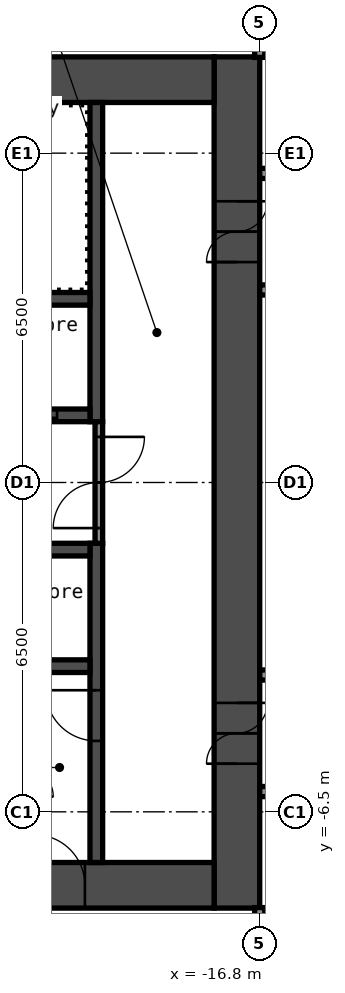
"""IFC4 building model, lengths in metres.
Left out: names, types, materials, properties, quantities, classifications, styles, units other than length and angle.
Written with IfcOpenShell. Run it as: python <this file> out.ifc"""

import sys

from ifc_helpers import new_model, si_unit, direction, frame, frame_2d, origin, place, context, subcontext, project, spatial, rectangle, extrude, element, fill, save


model = new_model("IFC4")
c1 = context("Model", 3, precision=1e-05, world=origin(), true_north=direction((0.0, 1.0)))
c2 = subcontext(c1, "Body", "Model", "MODEL_VIEW")
j1 = project(units=[si_unit("LENGTHUNIT", "METRE"), si_unit("PLANEANGLEUNIT", "RADIAN")], contexts=[c1])
p1 = place(None, origin())
s1 = spatial("IfcSite", under=j1, at=p1, CompositionType="ELEMENT")
p2 = place(p1, origin())
s2 = spatial("IfcBuilding", under=s1, at=p2, CompositionType="ELEMENT")
p3 = place(p2, frame((0.0, 0.0, 35.8)))
s3 = spatial("IfcBuildingStorey", under=s2, at=p3, CompositionType="ELEMENT", Elevation=35.8)
p4 = place(p3, frame((-17.25, -8.4, 0.0), z_axis=(0.0, 0.0, 1.0), x_axis=(0.0, 1.0, 0.0)))
e1 = element("IfcWall", 1, at=p4, inside=s3, PredefinedType="SHEAR", context=c2, shape_type="SweptSolid", body=[
    extrude(rectangle(XDim=16.8, YDim=0.9, at=frame_2d((8.4, 0.0))), origin(), (0.0, 0.0, 1.0), 2.8),
])
p5 = place(p4, frame((12.75, 0.0, 0.0)))
e2 = element("IfcOpeningElement", 2, at=p5, cuts=e1, PredefinedType="OPENING", context=c2, shape_type="SweptSolid", body=[
    extrude(rectangle(XDim=1.2, YDim=2.1, at=frame_2d((0.6, 1.05))), frame((0.0, 0.46, 0.0), z_axis=(0.0, -1.0, 0.0), x_axis=(1.0, 0.0, 0.0)), (0.0, 0.0, 1.0), 0.92),
])
p6 = place(p4, frame((2.85, 0.0, 0.0)))
e3 = element("IfcOpeningElement", 3, at=p6, cuts=e1, PredefinedType="OPENING", context=c2, shape_type="SweptSolid", body=[
    extrude(rectangle(XDim=1.2, YDim=2.1, at=frame_2d((0.6, 1.05))), frame((0.0, 0.46, 0.0), z_axis=(0.0, -1.0, 0.0), x_axis=(1.0, 0.0, 0.0)), (0.0, 0.0, 1.0), 0.92),
])
p7 = place(p3, frame((-32.7, 7.95, 0.0), z_axis=(0.0, 0.0, 1.0), x_axis=(1.0, 0.0, 0.0)))
e4 = element("IfcWall", 4, at=p7, inside=s3, PredefinedType="SHEAR", context=c2, shape_type="SweptSolid", body=[
    extrude(rectangle(XDim=15.0, YDim=0.9, at=frame_2d((7.5, 0.0))), origin(), (0.0, 0.0, 1.0), 2.8),
])
p8 = place(p7, frame((3.4, 0.0, 0.0)))
e5 = element("IfcOpeningElement", 5, at=p8, cuts=e4, PredefinedType="OPENING", context=c2, shape_type="SweptSolid", body=[
    extrude(rectangle(XDim=1.2, YDim=2.1, at=frame_2d((0.6, 1.05))), frame((0.0, 0.46, 0.0), z_axis=(0.0, -1.0, 0.0), x_axis=(1.0, 0.0, 0.0)), (0.0, 0.0, 1.0), 0.92),
])
p9 = place(p7, frame((0.75, 0.0, 0.0)))
e6 = element("IfcOpeningElement", 6, at=p9, cuts=e4, PredefinedType="OPENING", context=c2, shape_type="SweptSolid", body=[
    extrude(rectangle(XDim=0.9, YDim=2.1, at=frame_2d((0.45, 1.05))), frame((0.0, 0.46, 0.0), z_axis=(0.0, -1.0, 0.0), x_axis=(1.0, 0.0, 0.0)), (0.0, 0.0, 1.0), 0.92),
])
p10 = place(p3, frame((-32.7, -7.95, 0.0), z_axis=(0.0, 0.0, 1.0), x_axis=(1.0, 0.0, 0.0)))
e7 = element("IfcWall", 7, at=p10, inside=s3, PredefinedType="SHEAR", context=c2, shape_type="SweptSolid", body=[
    extrude(rectangle(XDim=15.0, YDim=0.9, at=frame_2d((7.5, 0.0))), origin(), (0.0, 0.0, 1.0), 2.8),
])
p11 = place(p10, frame((11.45, 0.0, 0.0)))
e8 = element("IfcOpeningElement", 8, at=p11, cuts=e7, PredefinedType="OPENING", context=c2, shape_type="SweptSolid", body=[
    extrude(rectangle(XDim=1.0, YDim=2.1, at=frame_2d((0.5, 1.05))), frame((0.0, 0.46, 0.0), z_axis=(0.0, -1.0, 0.0), x_axis=(1.0, 0.0, 0.0)), (0.0, 0.0, 1.0), 0.92),
])
p12 = place(p3, frame((-20.025, 1.2, 0.0), z_axis=(0.0, 0.0, 1.0), x_axis=(0.0, 1.0, 0.0)))
e9 = element("IfcWall", 9, at=p12, inside=s3, PredefinedType="SHEAR", context=c2, shape_type="SweptSolid", body=[
    extrude(rectangle(XDim=6.3, YDim=0.25, at=frame_2d((3.15, 0.0))), origin(), (0.0, 0.0, 1.0), 2.8),
])
p13 = place(p3, frame((-20.025, -7.5, 0.0), z_axis=(0.0, 0.0, 1.0), x_axis=(0.0, 1.0, 0.0)))
e10 = element("IfcWall", 10, at=p13, inside=s3, PredefinedType="SHEAR", context=c2, shape_type="SweptSolid", body=[
    extrude(rectangle(XDim=6.3, YDim=0.25, at=frame_2d((3.15, 0.0))), origin(), (0.0, 0.0, 1.0), 2.8),
])
p14 = place(p13, frame((2.4, 0.0, 0.0)))
e11 = element("IfcOpeningElement", 11, at=p14, cuts=e10, PredefinedType="OPENING", context=c2, shape_type="SweptSolid", body=[
    extrude(rectangle(XDim=1.0, YDim=2.1, at=frame_2d((0.5, 1.05))), frame((0.0, 0.135, 0.0), z_axis=(0.0, -1.0, 0.0), x_axis=(1.0, 0.0, 0.0)), (0.0, 0.0, 1.0), 0.27),
])
p15 = place(p3, frame((-27.65, 1.325, 0.0), z_axis=(0.0, 0.0, 1.0), x_axis=(1.0, 0.0, 0.0)))
e12 = element("IfcWall", 12, at=p15, inside=s3, PredefinedType="SHEAR", context=c2, shape_type="SweptSolid", body=[
    extrude(rectangle(XDim=7.5, YDim=0.25, at=frame_2d((3.75, 0.0))), origin(), (0.0, 0.0, 1.0), 2.8),
])
p16 = place(p15, frame((5.75, 0.0, 0.0)))
e13 = element("IfcOpeningElement", 13, at=p16, cuts=e12, PredefinedType="OPENING", context=c2, shape_type="SweptSolid", body=[
    extrude(rectangle(XDim=1.1, YDim=2.1, at=frame_2d((0.55, 1.05))), frame((0.0, 0.135, 0.0), z_axis=(0.0, -1.0, 0.0), x_axis=(1.0, 0.0, 0.0)), (0.0, 0.0, 1.0), 0.27),
])
p17 = place(p15, frame((3.35, 0.0, 0.0)))
e14 = element("IfcOpeningElement", 14, at=p17, cuts=e12, PredefinedType="OPENING", context=c2, shape_type="SweptSolid", body=[
    extrude(rectangle(XDim=1.1, YDim=2.1, at=frame_2d((0.55, 1.05))), frame((0.0, 0.135, 0.0), z_axis=(0.0, -1.0, 0.0), x_axis=(1.0, 0.0, 0.0)), (0.0, 0.0, 1.0), 0.27),
])
p18 = place(p15, frame((0.95, 0.0, 0.0)))
e15 = element("IfcOpeningElement", 15, at=p18, cuts=e12, PredefinedType="OPENING", context=c2, shape_type="SweptSolid", body=[
    extrude(rectangle(XDim=1.1, YDim=2.1, at=frame_2d((0.55, 1.05))), frame((0.0, 0.135, 0.0), z_axis=(0.0, -1.0, 0.0), x_axis=(1.0, 0.0, 0.0)), (0.0, 0.0, 1.0), 0.27),
])
for number, where, z_axis, x_axis in (
    (16, (-27.65, 3.625, 0.0), (0.0, 0.0, 1.0), (1.0, 0.0, 0.0)),
    (17, (-27.65, -1.325, 0.0), (0.0, 0.0, 1.0), (1.0, 0.0, 0.0)),
    (18, (-27.65, -3.625, 0.0), (0.0, 0.0, 1.0), (1.0, 0.0, 0.0)),
):
    element("IfcWall", number, at=place(p3, frame(where, z_axis=z_axis, x_axis=x_axis)), inside=s3, PredefinedType="SHEAR", context=c2, shape_type="SweptSolid", body=[
        extrude(rectangle(XDim=7.5, YDim=0.25, at=frame_2d((3.75, 0.0))), origin(), (0.0, 0.0, 1.0), 2.8),
    ])
p19 = place(p3, frame((-19.975, -1.2, 0.0), z_axis=(0.0, 0.0, 1.0), x_axis=(0.0, 1.0, 0.0)))
e19 = element("IfcWall", 19, at=p19, inside=s3, PredefinedType="PARTITIONING", context=c2, shape_type="SweptSolid", body=[
    extrude(rectangle(XDim=2.4, YDim=0.15, at=frame_2d((1.2, 0.0))), origin(), (0.0, 0.0, 1.0), 2.8),
])
p20 = place(p19, frame((0.3, 0.0, 0.0)))
e20 = element("IfcOpeningElement", 20, at=p20, cuts=e19, PredefinedType="OPENING", context=c2, shape_type="SweptSolid", body=[
    extrude(rectangle(XDim=1.8, YDim=2.1, at=frame_2d((0.9, 1.05))), frame((0.0, 0.085, 0.0), z_axis=(0.0, -1.0, 0.0), x_axis=(1.0, 0.0, 0.0)), (0.0, 0.0, 1.0), 0.17),
])
p21 = place(p3, frame((-16.8, -6.1, 0.0), z_axis=(0.0, 0.0, 1.0), x_axis=(1.0, 0.0, 0.0)))
e21 = element("IfcWall", 21, at=p21, inside=s3, PredefinedType="PARTITIONING", context=c2, shape_type="SweptSolid", body=[
    extrude(rectangle(XDim=33.6, YDim=0.2, at=frame_2d((16.8, 0.0))), origin(), (0.0, 0.0, 1.0), 2.8),
])
p22 = place(p21, frame((5.4, 0.0, 0.0)))
e22 = element("IfcOpeningElement", 22, at=p22, cuts=e21, PredefinedType="OPENING", context=c2, shape_type="SweptSolid", body=[
    extrude(rectangle(XDim=1.0, YDim=2.1, at=frame_2d((0.5, 1.05))), frame((0.0, 0.11, 0.0), z_axis=(0.0, -1.0, 0.0), x_axis=(1.0, 0.0, 0.0)), (0.0, 0.0, 1.0), 0.22),
])
p23 = place(p21, frame((9.545, 0.0, 0.0)))
e23 = element("IfcOpeningElement", 23, at=p23, cuts=e21, PredefinedType="OPENING", context=c2, shape_type="SweptSolid", body=[
    extrude(rectangle(XDim=0.9, YDim=2.1, at=frame_2d((0.45, 1.05))), frame((0.0, 0.11, 0.0), z_axis=(0.0, -1.0, 0.0), x_axis=(1.0, 0.0, 0.0)), (0.0, 0.0, 1.0), 0.22),
])
p24 = place(p21, frame((13.745, 0.0, 0.0)))
e24 = element("IfcOpeningElement", 24, at=p24, cuts=e21, PredefinedType="OPENING", context=c2, shape_type="SweptSolid", body=[
    extrude(rectangle(XDim=0.9, YDim=2.1, at=frame_2d((0.45, 1.05))), frame((0.0, 0.11, 0.0), z_axis=(0.0, -1.0, 0.0), x_axis=(1.0, 0.0, 0.0)), (0.0, 0.0, 1.0), 0.22),
])
p25 = place(p21, frame((22.2, 0.0, 0.0)))
e25 = element("IfcOpeningElement", 25, at=p25, cuts=e21, PredefinedType="OPENING", context=c2, shape_type="SweptSolid", body=[
    extrude(rectangle(XDim=1.0, YDim=2.1, at=frame_2d((0.5, 1.05))), frame((0.0, 0.11, 0.0), z_axis=(0.0, -1.0, 0.0), x_axis=(1.0, 0.0, 0.0)), (0.0, 0.0, 1.0), 0.22),
])
p26 = place(p21, frame((30.6, 0.0, 0.0)))
e26 = element("IfcOpeningElement", 26, at=p26, cuts=e21, PredefinedType="OPENING", context=c2, shape_type="SweptSolid", body=[
    extrude(rectangle(XDim=1.0, YDim=2.1, at=frame_2d((0.5, 1.05))), frame((0.0, 0.11, 0.0), z_axis=(0.0, -1.0, 0.0), x_axis=(1.0, 0.0, 0.0)), (0.0, 0.0, 1.0), 0.22),
])
p27 = place(p3, frame((-16.8, -3.8, 0.0), z_axis=(0.0, 0.0, 1.0), x_axis=(1.0, 0.0, 0.0)))
e27 = element("IfcWall", 27, at=p27, inside=s3, PredefinedType="PARTITIONING", context=c2, shape_type="SweptSolid", body=[
    extrude(rectangle(XDim=33.6, YDim=0.2, at=frame_2d((16.8, 0.0))), origin(), (0.0, 0.0, 1.0), 2.8),
])
p28 = place(p27, frame((9.8, 0.0, 0.0)))
e28 = element("IfcOpeningElement", 28, at=p28, cuts=e27, PredefinedType="OPENING", context=c2, shape_type="SweptSolid", body=[
    extrude(rectangle(XDim=0.9, YDim=2.1, at=frame_2d((0.45, 1.05))), frame((0.0, 0.11, 0.0), z_axis=(0.0, -1.0, 0.0), x_axis=(1.0, 0.0, 0.0)), (0.0, 0.0, 1.0), 0.22),
])
p29 = place(p27, frame((14.0, 0.0, 0.0)))
e29 = element("IfcOpeningElement", 29, at=p29, cuts=e27, PredefinedType="OPENING", context=c2, shape_type="SweptSolid", body=[
    extrude(rectangle(XDim=0.9, YDim=2.1, at=frame_2d((0.45, 1.05))), frame((0.0, 0.11, 0.0), z_axis=(0.0, -1.0, 0.0), x_axis=(1.0, 0.0, 0.0)), (0.0, 0.0, 1.0), 0.22),
])
p30 = place(p27, frame((27.355, 0.0, 0.0)))
e30 = element("IfcOpeningElement", 30, at=p30, cuts=e27, PredefinedType="OPENING", context=c2, shape_type="SweptSolid", body=[
    extrude(rectangle(XDim=0.9, YDim=2.1, at=frame_2d((0.45, 1.05))), frame((0.0, 0.11, 0.0), z_axis=(0.0, -1.0, 0.0), x_axis=(1.0, 0.0, 0.0)), (0.0, 0.0, 1.0), 0.22),
])
p31 = place(p27, frame((31.555, 0.0, 0.0)))
e31 = element("IfcOpeningElement", 31, at=p31, cuts=e27, PredefinedType="OPENING", context=c2, shape_type="SweptSolid", body=[
    extrude(rectangle(XDim=0.9, YDim=2.1, at=frame_2d((0.45, 1.05))), frame((0.0, 0.11, 0.0), z_axis=(0.0, -1.0, 0.0), x_axis=(1.0, 0.0, 0.0)), (0.0, 0.0, 1.0), 0.22),
])
p32 = place(p3, frame((-16.8, 3.8, 0.0), z_axis=(0.0, 0.0, 1.0), x_axis=(1.0, 0.0, 0.0)))
e32 = element("IfcWall", 32, at=p32, inside=s3, PredefinedType="PARTITIONING", context=c2, shape_type="SweptSolid", body=[
    extrude(rectangle(XDim=33.6, YDim=0.2, at=frame_2d((16.8, 0.0))), origin(), (0.0, 0.0, 1.0), 2.8),
])
p33 = place(p32, frame((1.9, 0.0, 0.0)))
e33 = element("IfcOpeningElement", 33, at=p33, cuts=e32, PredefinedType="OPENING", context=c2, shape_type="SweptSolid", body=[
    extrude(rectangle(XDim=0.9, YDim=2.1, at=frame_2d((0.45, 1.05))), frame((0.0, 0.11, 0.0), z_axis=(0.0, -1.0, 0.0), x_axis=(1.0, 0.0, 0.0)), (0.0, 0.0, 1.0), 0.22),
])
p34 = place(p32, frame((6.1, 0.0, 0.0)))
e34 = element("IfcOpeningElement", 34, at=p34, cuts=e32, PredefinedType="OPENING", context=c2, shape_type="SweptSolid", body=[
    extrude(rectangle(XDim=0.9, YDim=2.1, at=frame_2d((0.45, 1.05))), frame((0.0, 0.11, 0.0), z_axis=(0.0, -1.0, 0.0), x_axis=(1.0, 0.0, 0.0)), (0.0, 0.0, 1.0), 0.22),
])
p35 = place(p32, frame((18.115, 0.0, 0.0)))
e35 = element("IfcOpeningElement", 35, at=p35, cuts=e32, PredefinedType="OPENING", context=c2, shape_type="SweptSolid", body=[
    extrude(rectangle(XDim=0.9, YDim=2.1, at=frame_2d((0.45, 1.05))), frame((0.0, 0.11, 0.0), z_axis=(0.0, -1.0, 0.0), x_axis=(1.0, 0.0, 0.0)), (0.0, 0.0, 1.0), 0.22),
])
p36 = place(p32, frame((22.315, 0.0, 0.0)))
e36 = element("IfcOpeningElement", 36, at=p36, cuts=e32, PredefinedType="OPENING", context=c2, shape_type="SweptSolid", body=[
    extrude(rectangle(XDim=0.9, YDim=2.1, at=frame_2d((0.45, 1.05))), frame((0.0, 0.11, 0.0), z_axis=(0.0, -1.0, 0.0), x_axis=(1.0, 0.0, 0.0)), (0.0, 0.0, 1.0), 0.22),
])
p37 = place(p3, frame((-16.8, 6.1, 0.0), z_axis=(0.0, 0.0, 1.0), x_axis=(1.0, 0.0, 0.0)))
e37 = element("IfcWall", 37, at=p37, inside=s3, PredefinedType="PARTITIONING", context=c2, shape_type="SweptSolid", body=[
    extrude(rectangle(XDim=33.6, YDim=0.2, at=frame_2d((16.8, 0.0))), origin(), (0.0, 0.0, 1.0), 2.8),
])
p38 = place(p37, frame((1.9, 0.0, 0.0)))
e38 = element("IfcOpeningElement", 38, at=p38, cuts=e37, PredefinedType="OPENING", context=c2, shape_type="SweptSolid", body=[
    extrude(rectangle(XDim=1.0, YDim=2.1, at=frame_2d((0.5, 1.05))), frame((0.0, 0.11, 0.0), z_axis=(0.0, -1.0, 0.0), x_axis=(1.0, 0.0, 0.0)), (0.0, 0.0, 1.0), 0.22),
])
p39 = place(p37, frame((9.63, 0.0, 0.0)))
e39 = element("IfcOpeningElement", 39, at=p39, cuts=e37, PredefinedType="OPENING", context=c2, shape_type="SweptSolid", body=[
    extrude(rectangle(XDim=0.9, YDim=2.1, at=frame_2d((0.45, 1.05))), frame((0.0, 0.11, 0.0), z_axis=(0.0, -1.0, 0.0), x_axis=(1.0, 0.0, 0.0)), (0.0, 0.0, 1.0), 0.22),
])
p40 = place(p37, frame((13.83, 0.0, 0.0)))
e40 = element("IfcOpeningElement", 40, at=p40, cuts=e37, PredefinedType="OPENING", context=c2, shape_type="SweptSolid", body=[
    extrude(rectangle(XDim=0.9, YDim=2.1, at=frame_2d((0.45, 1.05))), frame((0.0, 0.11, 0.0), z_axis=(0.0, -1.0, 0.0), x_axis=(1.0, 0.0, 0.0)), (0.0, 0.0, 1.0), 0.22),
])
p41 = place(p37, frame((18.785, 0.0, 0.0)))
e41 = element("IfcOpeningElement", 41, at=p41, cuts=e37, PredefinedType="OPENING", context=c2, shape_type="SweptSolid", body=[
    extrude(rectangle(XDim=0.9, YDim=2.1, at=frame_2d((0.45, 1.05))), frame((0.0, 0.11, 0.0), z_axis=(0.0, -1.0, 0.0), x_axis=(1.0, 0.0, 0.0)), (0.0, 0.0, 1.0), 0.22),
])
p42 = place(p37, frame((22.985, 0.0, 0.0)))
e42 = element("IfcOpeningElement", 42, at=p42, cuts=e37, PredefinedType="OPENING", context=c2, shape_type="SweptSolid", body=[
    extrude(rectangle(XDim=0.9, YDim=2.1, at=frame_2d((0.45, 1.05))), frame((0.0, 0.11, 0.0), z_axis=(0.0, -1.0, 0.0), x_axis=(1.0, 0.0, 0.0)), (0.0, 0.0, 1.0), 0.22),
])
p43 = place(p37, frame((27.2, 0.0, 0.0)))
e43 = element("IfcOpeningElement", 43, at=p43, cuts=e37, PredefinedType="OPENING", context=c2, shape_type="SweptSolid", body=[
    extrude(rectangle(XDim=1.0, YDim=2.1, at=frame_2d((0.5, 1.05))), frame((0.0, 0.11, 0.0), z_axis=(0.0, -1.0, 0.0), x_axis=(1.0, 0.0, 0.0)), (0.0, 0.0, 1.0), 0.22),
])
for number, where, z_axis, x_axis in (
    (44, (-16.8, -20.3, 0.0), (0.0, 0.0, 1.0), (0.0, 1.0, 0.0)),
    (45, (-16.8, 8.39, 0.0), (0.0, 0.0, 1.0), (0.0, 1.0, 0.0)),
):
    element("IfcWall", number, at=place(p3, frame(where, z_axis=z_axis, x_axis=x_axis)), inside=s3, PredefinedType="PARTITIONING", context=c2, shape_type="SweptSolid", body=[
        extrude(rectangle(XDim=11.91, YDim=0.2, at=frame_2d((5.955, 0.0))), origin(), (0.0, 0.0, 1.0), 2.8),
    ])
p44 = place(p5, origin())
e46 = element("IfcDoor", 46, at=p44, inside=s3, OperationType="DOUBLE_DOOR_SINGLE_SWING", PredefinedType="DOOR", context=c2, shape_type="SweptSolid", body=[
    extrude(rectangle(XDim=1.2, YDim=2.1, at=frame_2d((0.6, 1.05))), frame((0.0, 0.025, 0.0), z_axis=(0.0, -1.0, 0.0), x_axis=(1.0, 0.0, 0.0)), (0.0, 0.0, 1.0), 0.05),
])
fill(e2, e46)
p45 = place(p6, origin())
e47 = element("IfcDoor", 47, at=p45, inside=s3, OperationType="DOUBLE_DOOR_SINGLE_SWING", PredefinedType="DOOR", context=c2, shape_type="SweptSolid", body=[
    extrude(rectangle(XDim=1.2, YDim=2.1, at=frame_2d((0.6, 1.05))), frame((0.0, 0.025, 0.0), z_axis=(0.0, -1.0, 0.0), x_axis=(1.0, 0.0, 0.0)), (0.0, 0.0, 1.0), 0.05),
])
fill(e3, e47)
p46 = place(p11, origin())
e48 = element("IfcDoor", 48, at=p46, inside=s3, OperationType="SINGLE_SWING_RIGHT", PredefinedType="DOOR", context=c2, shape_type="SweptSolid", body=[
    extrude(rectangle(XDim=1.0, YDim=2.1, at=frame_2d((0.5, 1.05))), frame((0.0, 0.025, 0.0), z_axis=(0.0, -1.0, 0.0), x_axis=(1.0, 0.0, 0.0)), (0.0, 0.0, 1.0), 0.05),
])
fill(e8, e48)
p47 = place(p14, origin())
e49 = element("IfcDoor", 49, at=p47, inside=s3, OperationType="SINGLE_SWING_LEFT", PredefinedType="DOOR", context=c2, shape_type="SweptSolid", body=[
    extrude(rectangle(XDim=1.0, YDim=2.1, at=frame_2d((0.5, 1.05))), frame((0.0, 0.025, 0.0), z_axis=(0.0, -1.0, 0.0), x_axis=(1.0, 0.0, 0.0)), (0.0, 0.0, 1.0), 0.05),
])
fill(e11, e49)
p48 = place(p20, origin())
e50 = element("IfcDoor", 50, at=p48, inside=s3, OperationType="DOUBLE_DOOR_SINGLE_SWING", PredefinedType="DOOR", context=c2, shape_type="SweptSolid", body=[
    extrude(rectangle(XDim=1.8, YDim=2.1, at=frame_2d((0.9, 1.05))), frame((0.0, 0.025, 0.0), z_axis=(0.0, -1.0, 0.0), x_axis=(1.0, 0.0, 0.0)), (0.0, 0.0, 1.0), 0.05),
])
fill(e20, e50)
p49 = place(p16, origin())
e51 = element("IfcDoor", 51, at=p49, inside=s3, OperationType="DOUBLE_DOOR_SLIDING", PredefinedType="DOOR", context=c2, shape_type="SweptSolid", body=[
    extrude(rectangle(XDim=1.1, YDim=2.1, at=frame_2d((0.55, 1.05))), frame((0.0, 0.025, 0.0), z_axis=(0.0, -1.0, 0.0), x_axis=(1.0, 0.0, 0.0)), (0.0, 0.0, 1.0), 0.05),
])
fill(e13, e51)
save(model, sys.argv[1])
